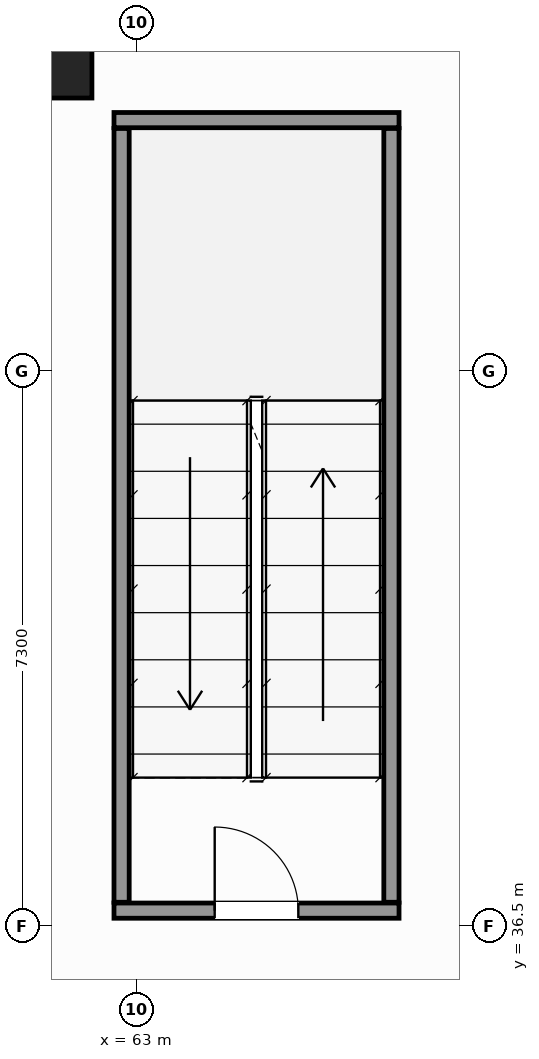
"""IFC4 building model, lengths in metres.
Left out: names, types, materials, properties, quantities, classifications, styles, units other than length and angle.
Written with IfcOpenShell. Run it as: python <this file> out.ifc"""

import sys

from ifc_helpers import new_model, si_unit, direction, frame, frame_2d, origin, origin_2d, place, context, subcontext, project, spatial, rectangle, hollow_circle, extrude, source, transform, mapped, element, fill, save


model = new_model("IFC4")
c1 = context("Model", 3, precision=1e-05, world=origin(), true_north=direction((0.0, 1.0)))
c2 = subcontext(c1, "Body", "Model", "MODEL_VIEW")
j1 = project(units=[si_unit("LENGTHUNIT", "METRE"), si_unit("PLANEANGLEUNIT", "RADIAN")], contexts=[c1])
p1 = place(None, origin())
s1 = spatial("IfcSite", under=j1, at=p1, CompositionType="ELEMENT")
p2 = place(p1, origin())
s2 = spatial("IfcBuilding", under=s1, at=p2, CompositionType="ELEMENT")
p3 = place(p2, frame((0.0, 0.0, -10.4)))
s3 = spatial("IfcBuildingStorey", under=s2, at=p3, CompositionType="ELEMENT", Elevation=-10.4)
m1 = source(origin(), c2, "Body", "SweptSolid", [
    extrude(hollow_circle(Radius=0.61, WallThickness=0.05, at=origin_2d()), origin(), (0.0, 0.0, 1.0), 5.2),
])
p4 = place(p3, frame((61.8, 48.0, 0.0), z_axis=(0.0, 0.0, 1.0), x_axis=(1.0, 0.0, 0.0)))
e1 = element("IfcColumn", 1, at=p4, inside=s3, PredefinedType="COLUMN", context=c2, shape_type="MappedRepresentation", body=[
    mapped(m1, transform((0.0, 0.0, 0.0), scale=1.0)),
])
p5 = place(p3, frame((62.7, 36.7, 0.0), z_axis=(0.0, 0.0, 1.0), x_axis=(1.0, 0.0, 0.0)))
e2 = element("IfcWall", 2, at=p5, inside=s3, PredefinedType="SOLIDWALL", context=c2, shape_type="SweptSolid", body=[
    extrude(rectangle(XDim=3.75, YDim=0.2, at=frame_2d((1.875, 0.0))), origin(), (0.0, 0.0, 1.0), 5.2),
])
p6 = place(p5, frame((1.325, 0.0, 0.0)))
e3 = element("IfcOpeningElement", 3, at=p6, cuts=e2, PredefinedType="OPENING", context=c2, shape_type="SweptSolid", body=[
    extrude(rectangle(XDim=1.1, YDim=2.15, at=frame_2d((0.55, 1.075))), frame((0.0, 0.11, 0.0), z_axis=(0.0, -1.0, 0.0), x_axis=(1.0, 0.0, 0.0)), (0.0, 0.0, 1.0), 0.22),
])
p7 = place(p3, frame((62.7, 47.1, 0.0), z_axis=(0.0, 0.0, 1.0), x_axis=(1.0, 0.0, 0.0)))
e4 = element("IfcWall", 4, at=p7, inside=s3, PredefinedType="SOLIDWALL", context=c2, shape_type="SweptSolid", body=[
    extrude(rectangle(XDim=3.75, YDim=0.2, at=frame_2d((1.875, 0.0))), origin(), (0.0, 0.0, 1.0), 5.2),
])
for number, where, z_axis, x_axis in (
    (5, (62.8, 36.81, 0.0), (0.0, 0.0, 1.0), (0.0, 1.0, 0.0)),
    (6, (66.35, 36.81, 0.0), (0.0, 0.0, 1.0), (0.0, 1.0, 0.0)),
):
    element("IfcWall", number, at=place(p3, frame(where, z_axis=z_axis, x_axis=x_axis)), inside=s3, PredefinedType="SOLIDWALL", context=c2, shape_type="SweptSolid", body=[
        extrude(rectangle(XDim=10.18, YDim=0.2, at=frame_2d((5.09, 0.0))), origin(), (0.0, 0.0, 1.0), 5.2),
    ])
m2 = source(origin(), c2, "Body", "SweptSolid", [
    extrude(rectangle(XDim=1.1, YDim=2.15, at=frame_2d((0.55, 1.075))), frame((0.0, 0.025, 0.0), z_axis=(0.0, -1.0, 0.0), x_axis=(1.0, 0.0, 0.0)), (0.0, 0.0, 1.0), 0.05),
])
p8 = place(p6, origin())
e7 = element("IfcDoor", 7, at=p8, inside=s3, OperationType="SINGLE_SWING_RIGHT", PredefinedType="DOOR", context=c2, shape_type="MappedRepresentation", body=[
    mapped(m2, transform((0.0, 0.0, 0.0), scale=1.0)),
])
fill(e3, e7)
save(model, sys.argv[1])
